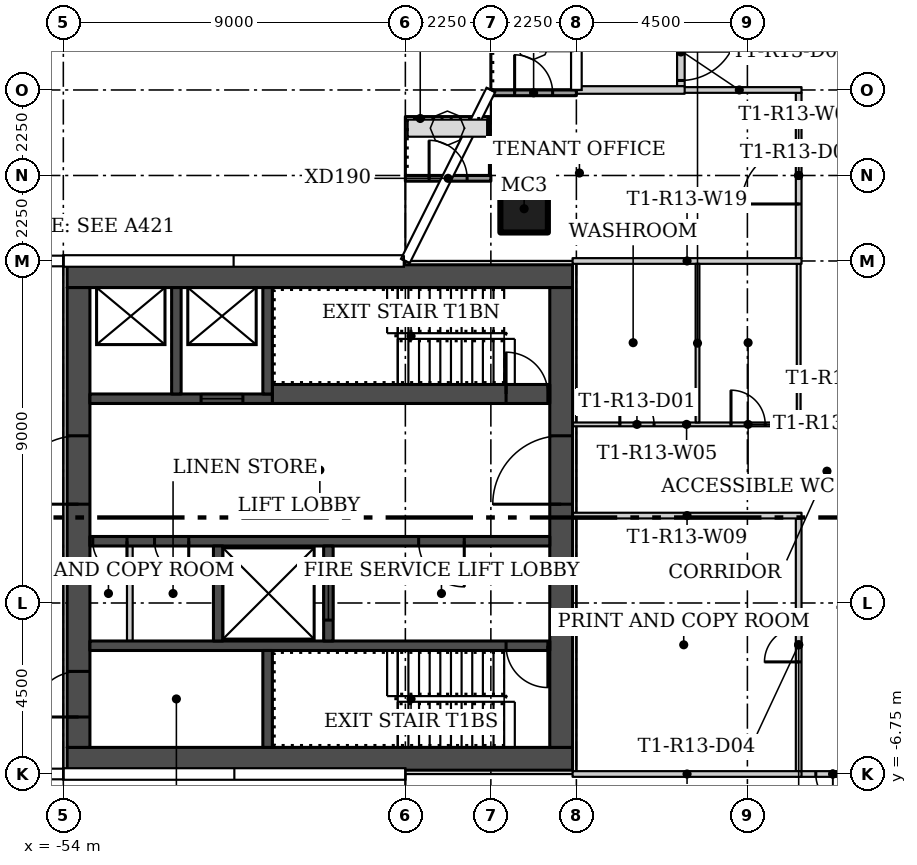
"""IFC4 building model, lengths in metres.
Left out: names, types, materials, properties, quantities, classifications, styles, units other than length and angle.
Written with IfcOpenShell. Run it as: python <this file> out.ifc"""

import sys

from ifc_helpers import new_model, si_unit, direction, frame, frame_2d, origin, origin_2d, place, context, subcontext, project, spatial, rectangle, hollow_rectangle, extrude, element, fill, save


model = new_model("IFC4")
c1 = context("Model", 3, precision=1e-05, world=origin(), true_north=direction((0.0, 1.0)))
c2 = subcontext(c1, "Body", "Model", "MODEL_VIEW")
j1 = project(units=[si_unit("LENGTHUNIT", "METRE"), si_unit("PLANEANGLEUNIT", "RADIAN")], contexts=[c1])
p1 = place(None, origin())
s1 = spatial("IfcSite", under=j1, at=p1, CompositionType="ELEMENT")
p2 = place(p1, origin())
s2 = spatial("IfcBuilding", under=s1, at=p2, CompositionType="ELEMENT")
p3 = place(p2, frame((0.0, 0.0, 124.8)))
s3 = spatial("IfcBuildingStorey", under=s2, at=p3, CompositionType="ELEMENT", Elevation=124.8)
p4 = place(p3, frame((-41.875, 8.125, 0.0)))
e1 = element("IfcColumn", 1, at=p4, inside=s3, PredefinedType="COLUMN", context=c2, shape_type="SweptSolid", body=[
    extrude(hollow_rectangle(XDim=1.25, YDim=1.25, WallThickness=0.05, at=origin_2d()), origin(), (0.0, 0.0, 1.0), 3.45),
])
p5 = place(p3, frame((-40.6, 2.45, 0.0)))
e2 = element("IfcWall", 2, at=p5, inside=s3, PredefinedType="PARTITIONING", context=c2, shape_type="SweptSolid", body=[
    extrude(rectangle(XDim=6.0, YDim=0.1, at=frame_2d((3.0, 0.0))), origin(), (0.0, 0.0, 1.0), 3.45),
])
p6 = place(p5, frame((1.244, 0.0, 0.0)))
e3 = element("IfcOpeningElement", 3, at=p6, cuts=e2, PredefinedType="OPENING", context=c2, shape_type="SweptSolid", body=[
    extrude(rectangle(XDim=0.9, YDim=2.1, at=frame_2d((0.45, 1.05))), frame((0.0, 0.06, 0.0), z_axis=(0.0, -1.0, 0.0), x_axis=(1.0, 0.0, 0.0)), (0.0, 0.0, 1.0), 0.12),
])
p7 = place(p5, frame((4.168, 0.0, 0.0)))
e4 = element("IfcOpeningElement", 4, at=p7, cuts=e2, PredefinedType="OPENING", context=c2, shape_type="SweptSolid", body=[
    extrude(rectangle(XDim=0.9, YDim=2.1, at=frame_2d((0.45, 1.05))), frame((0.0, 0.06, 0.0), z_axis=(0.0, -1.0, 0.0), x_axis=(1.0, 0.0, 0.0)), (0.0, 0.0, 1.0), 0.12),
])
p8 = place(p3, frame((-34.65, 2.5, 0.0), z_axis=(0.0, 0.0, 1.0), x_axis=(0.0, 1.0, 0.0)))
e5 = element("IfcWall", 5, at=p8, inside=s3, PredefinedType="PARTITIONING", context=c2, shape_type="SweptSolid", body=[
    extrude(rectangle(XDim=4.175, YDim=0.1, at=frame_2d((2.087, 0.0))), origin(), (0.0, 0.0, 1.0), 3.45),
])
p9 = place(p3, frame((-34.65, -6.675, 0.0), z_axis=(0.0, 0.0, 1.0), x_axis=(0.0, 1.0, 0.0)))
e6 = element("IfcWall", 6, at=p9, inside=s3, PredefinedType="PARTITIONING", context=c2, shape_type="SweptSolid", body=[
    extrude(rectangle(XDim=6.65, YDim=0.15, at=frame_2d((3.325, 0.0))), origin(), (0.0, 0.0, 1.0), 3.45),
])
p10 = place(p9, frame((2.875, 0.0, 0.0)))
e7 = element("IfcOpeningElement", 7, at=p10, cuts=e6, PredefinedType="OPENING", context=c2, shape_type="SweptSolid", body=[
    extrude(rectangle(XDim=0.9, YDim=2.1, at=frame_2d((0.45, 1.05))), frame((0.0, 0.085, 0.0), z_axis=(0.0, -1.0, 0.0), x_axis=(1.0, 0.0, 0.0)), (0.0, 0.0, 1.0), 0.17),
])
p11 = place(p3, frame((-34.65, 6.825, 0.0), z_axis=(0.0, 0.0, 1.0), x_axis=(0.0, 1.0, 0.0)))
e8 = element("IfcWall", 8, at=p11, inside=s3, PredefinedType="PARTITIONING", context=c2, shape_type="SweptSolid", body=[
    extrude(rectangle(XDim=4.35, YDim=0.15, at=frame_2d((2.175, 0.0))), origin(), (0.0, 0.0, 1.0), 3.45),
])
p12 = place(p11, frame((1.425, 0.0, 0.0)))
e9 = element("IfcOpeningElement", 9, at=p12, cuts=e8, PredefinedType="OPENING", context=c2, shape_type="SweptSolid", body=[
    extrude(rectangle(XDim=1.5, YDim=2.1, at=frame_2d((0.75, 1.05))), frame((0.0, 0.085, 0.0), z_axis=(0.0, -1.0, 0.0), x_axis=(1.0, 0.0, 0.0)), (0.0, 0.0, 1.0), 0.17),
])
p13 = place(p3, frame((-34.575, 0.05, 0.0), z_axis=(0.0, 0.0, 1.0), x_axis=(-1.0, 0.0, 0.0)))
e10 = element("IfcWall", 10, at=p13, inside=s3, PredefinedType="PARTITIONING", context=c2, shape_type="SweptSolid", body=[
    extrude(rectangle(XDim=6.025, YDim=0.15, at=frame_2d((3.012, 0.0))), origin(), (0.0, 0.0, 1.0), 3.45),
])
p14 = place(p3, frame((-34.575, 11.25, 0.0), z_axis=(0.0, 0.0, 1.0), x_axis=(-1.0, 0.0, 0.0)))
e11 = element("IfcWall", 11, at=p14, inside=s3, PredefinedType="PARTITIONING", context=c2, shape_type="SweptSolid", body=[
    extrude(rectangle(XDim=3.275, YDim=0.15, at=frame_2d((1.637, 0.0))), origin(), (0.0, 0.0, 1.0), 3.45),
])
p15 = place(p3, frame((-37.75, 13.15, 0.0), z_axis=(0.0, 0.0, 1.0), x_axis=(0.0, -1.0, 0.0)))
e12 = element("IfcWall", 12, at=p15, inside=s3, PredefinedType="PARTITIONING", context=c2, shape_type="SweptSolid", body=[
    extrude(rectangle(XDim=1.8, YDim=0.2, at=frame_2d((0.9, 0.0))), origin(), (0.0, 0.0, 1.0), 3.45),
])
p16 = place(p15, frame((0.15, 0.0, 0.0)))
e13 = element("IfcOpeningElement", 13, at=p16, cuts=e12, PredefinedType="OPENING", context=c2, shape_type="SweptSolid", body=[
    extrude(rectangle(XDim=1.5, YDim=2.4, at=frame_2d((0.75, 1.2))), frame((0.0, 0.11, 0.0), z_axis=(0.0, -1.0, 0.0), x_axis=(1.0, 0.0, 0.0)), (0.0, 0.0, 1.0), 0.22),
])
p17 = place(p3, frame((-32.787, -6.75, 0.0), z_axis=(0.0, 0.0, 1.0), x_axis=(-1.0, 0.0, 0.0)))
e14 = element("IfcWall", 14, at=p17, inside=s3, PredefinedType="PARTITIONING", context=c2, shape_type="SweptSolid", body=[
    extrude(rectangle(XDim=1.938, YDim=0.15, at=frame_2d((0.969, 0.0))), origin(), (0.0, 0.0, 1.0), 3.45),
])
p18 = place(p17, frame((0.513, 0.0, 0.0)))
e15 = element("IfcOpeningElement", 15, at=p18, cuts=e14, PredefinedType="OPENING", context=c2, shape_type="SweptSolid", body=[
    extrude(rectangle(XDim=0.9, YDim=2.1, at=frame_2d((0.45, 1.05))), frame((0.0, 0.085, 0.0), z_axis=(0.0, -1.0, 0.0), x_axis=(1.0, 0.0, 0.0)), (0.0, 0.0, 1.0), 0.17),
])
p19 = place(p3, frame((-34.575, 6.75, 0.0), z_axis=(0.0, 0.0, 1.0), x_axis=(-1.0, 0.0, 0.0)))
e16 = element("IfcWall", 16, at=p19, inside=s3, PredefinedType="PARTITIONING", context=c2, shape_type="SweptSolid", body=[
    extrude(rectangle(XDim=6.025, YDim=0.15, at=frame_2d((3.012, 0.0))), origin(), (0.0, 0.0, 1.0), 3.45),
])
p20 = place(p3, frame((-40.6, -6.75, 0.0)))
e17 = element("IfcWall", 17, at=p20, inside=s3, PredefinedType="PARTITIONING", context=c2, shape_type="SweptSolid", body=[
    extrude(rectangle(XDim=6.025, YDim=0.15, at=frame_2d((3.012, 0.0))), origin(), (0.0, 0.0, 1.0), 3.45),
])
p21 = place(p3, frame((-37.312, 2.5, 0.0), z_axis=(0.0, 0.0, 1.0), x_axis=(0.0, 1.0, 0.0)))
e18 = element("IfcWall", 18, at=p21, inside=s3, PredefinedType="PARTITIONING", context=c2, shape_type="SweptSolid", body=[
    extrude(rectangle(XDim=4.175, YDim=0.1, at=frame_2d((2.087, 0.0))), origin(), (0.0, 0.0, 1.0), 3.45),
])
p22 = place(p3, frame((-37.65, 11.25, 0.0), z_axis=(0.0, 0.0, 1.0), x_axis=(-1.0, 0.0, 0.0)))
e19 = element("IfcWall", 19, at=p22, inside=s3, PredefinedType="PARTITIONING", context=c2, shape_type="SweptSolid", body=[
    extrude(rectangle(XDim=2.85, YDim=0.2, at=frame_2d((1.425, 0.0))), origin(), (0.0, 0.0, 1.0), 3.45),
])
p23 = place(p3, frame((-42.75, 11.175, 0.0)))
e20 = element("IfcWall", 20, at=p23, inside=s3, PredefinedType="SOLIDWALL", context=c2, shape_type="SweptSolid", body=[
    extrude(rectangle(XDim=2.25, YDim=0.15, at=frame_2d((1.125, 0.0))), origin(), (0.0, 0.0, 1.0), 3.45),
])
p24 = place(p23, frame((0.625, 0.0, 0.0)))
e21 = element("IfcOpeningElement", 21, at=p24, cuts=e20, PredefinedType="OPENING", context=c2, shape_type="SweptSolid", body=[
    extrude(rectangle(XDim=1.0, YDim=2.4, at=frame_2d((0.5, 1.2))), frame((0.0, 0.085, 0.0), z_axis=(0.0, -1.0, 0.0), x_axis=(1.0, 0.0, 0.0)), (0.0, 0.0, 1.0), 0.17),
])
p25 = place(p3, frame((-45.0, 8.925, 0.0)))
e22 = element("IfcWall", 22, at=p25, inside=s3, PredefinedType="SOLIDWALL", context=c2, shape_type="SweptSolid", body=[
    extrude(rectangle(XDim=2.25, YDim=0.15, at=frame_2d((1.125, 0.0))), origin(), (0.0, 0.0, 1.0), 3.45),
])
p26 = place(p25, frame((0.625, 0.0, 0.0)))
e23 = element("IfcOpeningElement", 23, at=p26, cuts=e22, PredefinedType="OPENING", context=c2, shape_type="SweptSolid", body=[
    extrude(rectangle(XDim=1.0, YDim=2.4, at=frame_2d((0.5, 1.2))), frame((0.0, 0.085, 0.0), z_axis=(0.0, -1.0, 0.0), x_axis=(1.0, 0.0, 0.0)), (0.0, 0.0, 1.0), 0.17),
])
for number, where, z_axis, x_axis in (
    (24, (-40.6, -6.35, 0.0), (0.0, 0.0, 1.0), (-1.0, 0.0, 0.0)),
    (25, (-40.6, 6.35, 0.0), (0.0, 0.0, 1.0), (-1.0, 0.0, 0.0)),
):
    element("IfcWall", number, at=place(p3, frame(where, z_axis=z_axis, x_axis=x_axis)), inside=s3, PredefinedType="SHEAR", context=c2, shape_type="SweptSolid", body=[
        extrude(rectangle(XDim=13.3, YDim=0.6, at=frame_2d((6.65, 0.0))), origin(), (0.0, 0.0, 1.0), 3.45),
    ])
p27 = place(p3, frame((-40.9, -6.05, 0.0), z_axis=(0.0, 0.0, 1.0), x_axis=(0.0, 1.0, 0.0)))
e26 = element("IfcWall", 26, at=p27, inside=s3, PredefinedType="SHEAR", context=c2, shape_type="SweptSolid", body=[
    extrude(rectangle(XDim=12.1, YDim=0.6, at=frame_2d((6.05, 0.0))), origin(), (0.0, 0.0, 1.0), 3.45),
])
p28 = place(p27, frame((6.4, 0.0, 0.0)))
e27 = element("IfcOpeningElement", 27, at=p28, cuts=e26, PredefinedType="OPENING", context=c2, shape_type="SweptSolid", body=[
    extrude(rectangle(XDim=1.8, YDim=2.4, at=frame_2d((0.9, 1.2))), frame((0.0, 0.31, 0.0), z_axis=(0.0, -1.0, 0.0), x_axis=(1.0, 0.0, 0.0)), (0.0, 0.0, 1.0), 0.62),
])
p29 = place(p3, frame((-53.6, -6.05, 0.0), z_axis=(0.0, 0.0, 1.0), x_axis=(0.0, 1.0, 0.0)))
e28 = element("IfcWall", 28, at=p29, inside=s3, PredefinedType="SHEAR", context=c2, shape_type="SweptSolid", body=[
    extrude(rectangle(XDim=12.1, YDim=0.6, at=frame_2d((6.05, 0.0))), origin(), (0.0, 0.0, 1.0), 3.45),
])
p30 = place(p29, frame((0.8, 0.0, 0.0)))
e29 = element("IfcOpeningElement", 29, at=p30, cuts=e28, PredefinedType="OPENING", context=c2, shape_type="SweptSolid", body=[
    extrude(rectangle(XDim=1.2, YDim=2.1, at=frame_2d((0.6, 1.05))), frame((0.0, 0.31, 0.0), z_axis=(0.0, -1.0, 0.0), x_axis=(1.0, 0.0, 0.0)), (0.0, 0.0, 1.0), 0.62),
])
p31 = place(p29, frame((6.4, 0.0, 0.0)))
e30 = element("IfcOpeningElement", 30, at=p31, cuts=e28, PredefinedType="OPENING", context=c2, shape_type="SweptSolid", body=[
    extrude(rectangle(XDim=1.8, YDim=2.4, at=frame_2d((0.9, 1.2))), frame((0.0, 0.31, 0.0), z_axis=(0.0, -1.0, 0.0), x_axis=(1.0, 0.0, 0.0)), (0.0, 0.0, 1.0), 0.62),
])
p32 = place(p3, frame((-41.2, -3.375, 0.0), z_axis=(0.0, 0.0, 1.0), x_axis=(-1.0, 0.0, 0.0)))
e31 = element("IfcWall", 31, at=p32, inside=s3, PredefinedType="SHEAR", context=c2, shape_type="SweptSolid", body=[
    extrude(rectangle(XDim=12.1, YDim=0.25, at=frame_2d((6.05, 0.0))), origin(), (0.0, 0.0, 1.0), 3.45),
])
p33 = place(p32, frame((0.05, 0.0, 0.0)))
e32 = element("IfcOpeningElement", 32, at=p33, cuts=e31, PredefinedType="OPENING", context=c2, shape_type="SweptSolid", body=[
    extrude(rectangle(XDim=1.1, YDim=2.1, at=frame_2d((0.55, 1.05))), frame((0.0, 0.135, 0.0), z_axis=(0.0, -1.0, 0.0), x_axis=(1.0, 0.0, 0.0)), (0.0, 0.0, 1.0), 0.27),
])
p34 = place(p3, frame((-48.625, -6.05, 0.0), z_axis=(0.0, 0.0, 1.0), x_axis=(0.0, 1.0, 0.0)))
e33 = element("IfcWall", 33, at=p34, inside=s3, PredefinedType="SHEAR", context=c2, shape_type="SweptSolid", body=[
    extrude(rectangle(XDim=2.55, YDim=0.25, at=frame_2d((1.275, 0.0))), origin(), (0.0, 0.0, 1.0), 3.45),
])
p35 = place(p3, frame((-41.2, -0.625, 0.0), z_axis=(0.0, 0.0, 1.0), x_axis=(-1.0, 0.0, 0.0)))
e34 = element("IfcWall", 34, at=p35, inside=s3, PredefinedType="SHEAR", context=c2, shape_type="SweptSolid", body=[
    extrude(rectangle(XDim=12.1, YDim=0.25, at=frame_2d((6.05, 0.0))), origin(), (0.0, 0.0, 1.0), 3.45),
])
p36 = place(p35, frame((2.25, 0.0, 0.0)))
e35 = element("IfcOpeningElement", 35, at=p36, cuts=e34, PredefinedType="OPENING", context=c2, shape_type="SweptSolid", body=[
    extrude(rectangle(XDim=1.2, YDim=2.1, at=frame_2d((0.6, 1.05))), frame((0.0, 0.135, 0.0), z_axis=(0.0, -1.0, 0.0), x_axis=(1.0, 0.0, 0.0)), (0.0, 0.0, 1.0), 0.27),
])
p37 = place(p35, frame((9.5, 0.0, 0.0)))
e36 = element("IfcOpeningElement", 36, at=p37, cuts=e34, PredefinedType="OPENING", context=c2, shape_type="SweptSolid", body=[
    extrude(rectangle(XDim=0.9, YDim=2.1, at=frame_2d((0.45, 1.05))), frame((0.0, 0.135, 0.0), z_axis=(0.0, -1.0, 0.0), x_axis=(1.0, 0.0, 0.0)), (0.0, 0.0, 1.0), 0.27),
])
p38 = place(p35, frame((11.125, 0.0, 0.0)))
e37 = element("IfcOpeningElement", 37, at=p38, cuts=e34, PredefinedType="OPENING", context=c2, shape_type="SweptSolid", body=[
    extrude(rectangle(XDim=0.9, YDim=2.1, at=frame_2d((0.45, 1.05))), frame((0.0, 0.135, 0.0), z_axis=(0.0, -1.0, 0.0), x_axis=(1.0, 0.0, 0.0)), (0.0, 0.0, 1.0), 0.27),
])
p39 = place(p3, frame((-47.025, -3.25, 0.0), z_axis=(0.0, 0.0, 1.0), x_axis=(0.0, 1.0, 0.0)))
e38 = element("IfcWall", 38, at=p39, inside=s3, PredefinedType="SHEAR", context=c2, shape_type="SweptSolid", body=[
    extrude(rectangle(XDim=2.5, YDim=0.25, at=frame_2d((1.25, 0.0))), origin(), (0.0, 0.0, 1.0), 3.45),
])
p40 = place(p39, frame((0.55, 0.0, 0.0)))
e39 = element("IfcOpeningElement", 39, at=p40, cuts=e38, PredefinedType="OPENING", context=c2, shape_type="SweptSolid", body=[
    extrude(rectangle(XDim=1.4, YDim=2.4, at=frame_2d((0.7, 1.2))), frame((0.0, 0.135, 0.0), z_axis=(0.0, -1.0, 0.0), x_axis=(1.0, 0.0, 0.0)), (0.0, 0.0, 1.0), 0.27),
])
p41 = place(p3, frame((-49.925, -3.25, 0.0), z_axis=(0.0, 0.0, 1.0), x_axis=(0.0, 1.0, 0.0)))
e40 = element("IfcWall", 40, at=p41, inside=s3, PredefinedType="SHEAR", context=c2, shape_type="SweptSolid", body=[
    extrude(rectangle(XDim=2.5, YDim=0.25, at=frame_2d((1.25, 0.0))), origin(), (0.0, 0.0, 1.0), 3.45),
])
p42 = place(p3, frame((-52.25, -3.25, 0.0), z_axis=(0.0, 0.0, 1.0), x_axis=(0.0, 1.0, 0.0)))
e41 = element("IfcWall", 41, at=p42, inside=s3, PredefinedType="PARTITIONING", context=c2, shape_type="SweptSolid", body=[
    extrude(rectangle(XDim=2.5, YDim=0.15, at=frame_2d((1.25, 0.0))), origin(), (0.0, 0.0, 1.0), 3.45),
])
p43 = place(p3, frame((-48.5, 3.25, 0.0)))
e42 = element("IfcWall", 42, at=p43, inside=s3, PredefinedType="SHEAR", context=c2, shape_type="SweptSolid", body=[
    extrude(rectangle(XDim=7.3, YDim=0.5, at=frame_2d((3.65, 0.0))), origin(), (0.0, 0.0, 1.0), 3.45),
])
p44 = place(p43, frame((6.15, 0.0, 0.0)))
e43 = element("IfcOpeningElement", 43, at=p44, cuts=e42, PredefinedType="OPENING", context=c2, shape_type="SweptSolid", body=[
    extrude(rectangle(XDim=1.1, YDim=2.1, at=frame_2d((0.55, 1.05))), frame((0.0, 0.26, 0.0), z_axis=(0.0, -1.0, 0.0), x_axis=(1.0, 0.0, 0.0)), (0.0, 0.0, 1.0), 0.52),
])
p45 = place(p3, frame((-48.5, 3.125, 0.0), z_axis=(0.0, 0.0, 1.0), x_axis=(-1.0, 0.0, 0.0)))
e44 = element("IfcWall", 44, at=p45, inside=s3, PredefinedType="SHEAR", context=c2, shape_type="SweptSolid", body=[
    extrude(rectangle(XDim=4.8, YDim=0.25, at=frame_2d((2.4, 0.0))), origin(), (0.0, 0.0, 1.0), 3.45),
])
p46 = place(p45, frame((0.775, 0.0, 0.0)))
e45 = element("IfcOpeningElement", 45, at=p46, cuts=e44, PredefinedType="OPENING", context=c2, shape_type="SweptSolid", body=[
    extrude(rectangle(XDim=1.1, YDim=2.1, at=frame_2d((0.55, 1.05))), frame((0.0, 0.135, 0.0), z_axis=(0.0, -1.0, 0.0), x_axis=(1.0, 0.0, 0.0)), (0.0, 0.0, 1.0), 0.27),
])
for number, where, z_axis, x_axis in (
    (46, (-48.625, 3.25, 0.0), (0.0, 0.0, 1.0), (0.0, 1.0, 0.0)),
    (47, (-51.025, 3.25, 0.0), (0.0, 0.0, 1.0), (0.0, 1.0, 0.0)),
):
    element("IfcWall", number, at=place(p3, frame(where, z_axis=z_axis, x_axis=x_axis)), inside=s3, PredefinedType="SHEAR", context=c2, shape_type="SweptSolid", body=[
        extrude(rectangle(XDim=2.8, YDim=0.25, at=frame_2d((1.4, 0.0))), origin(), (0.0, 0.0, 1.0), 3.45),
    ])
p47 = place(p6, origin())
e48 = element("IfcDoor", 48, at=p47, inside=s3, OperationType="SINGLE_SWING_LEFT", PredefinedType="DOOR", context=c2, shape_type="SweptSolid", body=[
    extrude(rectangle(XDim=0.9, YDim=2.1, at=frame_2d((0.45, 1.05))), frame((0.0, 0.025, 0.0), z_axis=(0.0, -1.0, 0.0), x_axis=(1.0, 0.0, 0.0)), (0.0, 0.0, 1.0), 0.05),
])
fill(e3, e48)
p48 = place(p7, origin())
e49 = element("IfcDoor", 49, at=p48, inside=s3, OperationType="SINGLE_SWING_LEFT", PredefinedType="DOOR", context=c2, shape_type="SweptSolid", body=[
    extrude(rectangle(XDim=0.9, YDim=2.1, at=frame_2d((0.45, 1.05))), frame((0.0, 0.025, 0.0), z_axis=(0.0, -1.0, 0.0), x_axis=(1.0, 0.0, 0.0)), (0.0, 0.0, 1.0), 0.05),
])
fill(e4, e49)
p49 = place(p16, origin())
e50 = element("IfcDoor", 50, at=p49, inside=s3, OperationType="DOUBLE_DOOR_SINGLE_SWING", PredefinedType="DOOR", context=c2, shape_type="SweptSolid", body=[
    extrude(rectangle(XDim=1.5, YDim=2.4, at=frame_2d((0.75, 1.2))), frame((0.0, 0.025, 0.0), z_axis=(0.0, -1.0, 0.0), x_axis=(1.0, 0.0, 0.0)), (0.0, 0.0, 1.0), 0.05),
])
fill(e13, e50)
p50 = place(p10, origin())
e51 = element("IfcDoor", 51, at=p50, inside=s3, OperationType="SINGLE_SWING_RIGHT", PredefinedType="DOOR", context=c2, shape_type="SweptSolid", body=[
    extrude(rectangle(XDim=0.9, YDim=2.1, at=frame_2d((0.45, 1.05))), frame((0.0, 0.025, 0.0), z_axis=(0.0, -1.0, 0.0), x_axis=(1.0, 0.0, 0.0)), (0.0, 0.0, 1.0), 0.05),
])
fill(e7, e51)
p51 = place(p12, origin())
e52 = element("IfcDoor", 52, at=p51, inside=s3, OperationType="DOUBLE_DOOR_SINGLE_SWING", PredefinedType="DOOR", context=c2, shape_type="SweptSolid", body=[
    extrude(rectangle(XDim=1.5, YDim=2.1, at=frame_2d((0.75, 1.05))), frame((0.0, 0.025, 0.0), z_axis=(0.0, -1.0, 0.0), x_axis=(1.0, 0.0, 0.0)), (0.0, 0.0, 1.0), 0.05),
])
fill(e9, e52)
p52 = place(p18, origin())
e53 = element("IfcDoor", 53, at=p52, inside=s3, OperationType="SINGLE_SWING_RIGHT", PredefinedType="DOOR", context=c2, shape_type="SweptSolid", body=[
    extrude(rectangle(XDim=0.9, YDim=2.1, at=frame_2d((0.45, 1.05))), frame((0.0, 0.025, 0.0), z_axis=(0.0, -1.0, 0.0), x_axis=(1.0, 0.0, 0.0)), (0.0, 0.0, 1.0), 0.05),
])
fill(e15, e53)
p53 = place(p24, origin())
e54 = element("IfcDoor", 54, at=p53, inside=s3, OperationType="SINGLE_SWING_LEFT", PredefinedType="DOOR", context=c2, shape_type="SweptSolid", body=[
    extrude(rectangle(XDim=1.0, YDim=2.4, at=frame_2d((0.5, 1.2))), frame((0.0, 0.025, 0.0), z_axis=(0.0, -1.0, 0.0), x_axis=(1.0, 0.0, 0.0)), (0.0, 0.0, 1.0), 0.05),
])
fill(e21, e54)
p54 = place(p26, origin())
e55 = element("IfcDoor", 55, at=p54, inside=s3, OperationType="SINGLE_SWING_RIGHT", PredefinedType="DOOR", context=c2, shape_type="SweptSolid", body=[
    extrude(rectangle(XDim=1.0, YDim=2.4, at=frame_2d((0.5, 1.2))), frame((0.0, 0.025, 0.0), z_axis=(0.0, -1.0, 0.0), x_axis=(1.0, 0.0, 0.0)), (0.0, 0.0, 1.0), 0.05),
])
fill(e23, e55)
p55 = place(p28, origin())
e56 = element("IfcDoor", 56, at=p55, inside=s3, OperationType="DOUBLE_DOOR_SINGLE_SWING", PredefinedType="DOOR", context=c2, shape_type="SweptSolid", body=[
    extrude(rectangle(XDim=1.8, YDim=2.4, at=frame_2d((0.9, 1.2))), frame((0.0, 0.025, 0.0), z_axis=(0.0, -1.0, 0.0), x_axis=(1.0, 0.0, 0.0)), (0.0, 0.0, 1.0), 0.05),
])
fill(e27, e56)
p56 = place(p30, origin())
e57 = element("IfcDoor", 57, at=p56, inside=s3, OperationType="SINGLE_SWING_LEFT", PredefinedType="DOOR", context=c2, shape_type="SweptSolid", body=[
    extrude(rectangle(XDim=1.2, YDim=2.1, at=frame_2d((0.6, 1.05))), frame((0.0, 0.025, 0.0), z_axis=(0.0, -1.0, 0.0), x_axis=(1.0, 0.0, 0.0)), (0.0, 0.0, 1.0), 0.05),
])
fill(e29, e57)
p57 = place(p31, origin())
e58 = element("IfcDoor", 58, at=p57, inside=s3, OperationType="DOUBLE_DOOR_SINGLE_SWING", PredefinedType="DOOR", context=c2, shape_type="SweptSolid", body=[
    extrude(rectangle(XDim=1.8, YDim=2.4, at=frame_2d((0.9, 1.2))), frame((0.0, 0.025, 0.0), z_axis=(0.0, -1.0, 0.0), x_axis=(1.0, 0.0, 0.0)), (0.0, 0.0, 1.0), 0.05),
])
fill(e30, e58)
p58 = place(p33, origin())
e59 = element("IfcDoor", 59, at=p58, inside=s3, OperationType="SINGLE_SWING_LEFT", PredefinedType="DOOR", context=c2, shape_type="SweptSolid", body=[
    extrude(rectangle(XDim=1.1, YDim=2.1, at=frame_2d((0.55, 1.05))), frame((0.0, 0.025, 0.0), z_axis=(0.0, -1.0, 0.0), x_axis=(1.0, 0.0, 0.0)), (0.0, 0.0, 1.0), 0.05),
])
fill(e32, e59)
p59 = place(p36, origin())
e60 = element("IfcDoor", 60, at=p59, inside=s3, OperationType="SINGLE_SWING_LEFT", PredefinedType="DOOR", context=c2, shape_type="SweptSolid", body=[
    extrude(rectangle(XDim=1.2, YDim=2.1, at=frame_2d((0.6, 1.05))), frame((0.0, 0.025, 0.0), z_axis=(0.0, -1.0, 0.0), x_axis=(1.0, 0.0, 0.0)), (0.0, 0.0, 1.0), 0.05),
])
fill(e35, e60)
p60 = place(p37, origin())
e61 = element("IfcDoor", 61, at=p60, inside=s3, OperationType="SINGLE_SWING_RIGHT", PredefinedType="DOOR", context=c2, shape_type="SweptSolid", body=[
    extrude(rectangle(XDim=0.9, YDim=2.1, at=frame_2d((0.45, 1.05))), frame((0.0, 0.025, 0.0), z_axis=(0.0, -1.0, 0.0), x_axis=(1.0, 0.0, 0.0)), (0.0, 0.0, 1.0), 0.05),
])
fill(e36, e61)
p61 = place(p38, origin())
e62 = element("IfcDoor", 62, at=p61, inside=s3, OperationType="SINGLE_SWING_RIGHT", PredefinedType="DOOR", context=c2, shape_type="SweptSolid", body=[
    extrude(rectangle(XDim=0.9, YDim=2.1, at=frame_2d((0.45, 1.05))), frame((0.0, 0.025, 0.0), z_axis=(0.0, -1.0, 0.0), x_axis=(1.0, 0.0, 0.0)), (0.0, 0.0, 1.0), 0.05),
])
fill(e37, e62)
p62 = place(p40, origin())
e63 = element("IfcDoor", 63, at=p62, inside=s3, OperationType="SLIDING_TO_LEFT", PredefinedType="DOOR", context=c2, shape_type="SweptSolid", body=[
    extrude(rectangle(XDim=1.4, YDim=2.4, at=frame_2d((0.7, 1.2))), frame((0.0, 0.025, 0.0), z_axis=(0.0, -1.0, 0.0), x_axis=(1.0, 0.0, 0.0)), (0.0, 0.0, 1.0), 0.05),
])
fill(e39, e63)
p63 = place(p44, origin())
e64 = element("IfcDoor", 64, at=p63, inside=s3, OperationType="SINGLE_SWING_RIGHT", PredefinedType="DOOR", context=c2, shape_type="SweptSolid", body=[
    extrude(rectangle(XDim=1.1, YDim=2.1, at=frame_2d((0.55, 1.05))), frame((0.0, 0.025, 0.0), z_axis=(0.0, -1.0, 0.0), x_axis=(1.0, 0.0, 0.0)), (0.0, 0.0, 1.0), 0.05),
])
fill(e43, e64)
p64 = place(p46, origin())
e65 = element("IfcDoor", 65, at=p64, inside=s3, OperationType="SLIDING_TO_LEFT", PredefinedType="DOOR", context=c2, shape_type="SweptSolid", body=[
    extrude(rectangle(XDim=1.1, YDim=2.1, at=frame_2d((0.55, 1.05))), frame((0.0, 0.025, 0.0), z_axis=(0.0, -1.0, 0.0), x_axis=(1.0, 0.0, 0.0)), (0.0, 0.0, 1.0), 0.05),
])
fill(e45, e65)
save(model, sys.argv[1])
